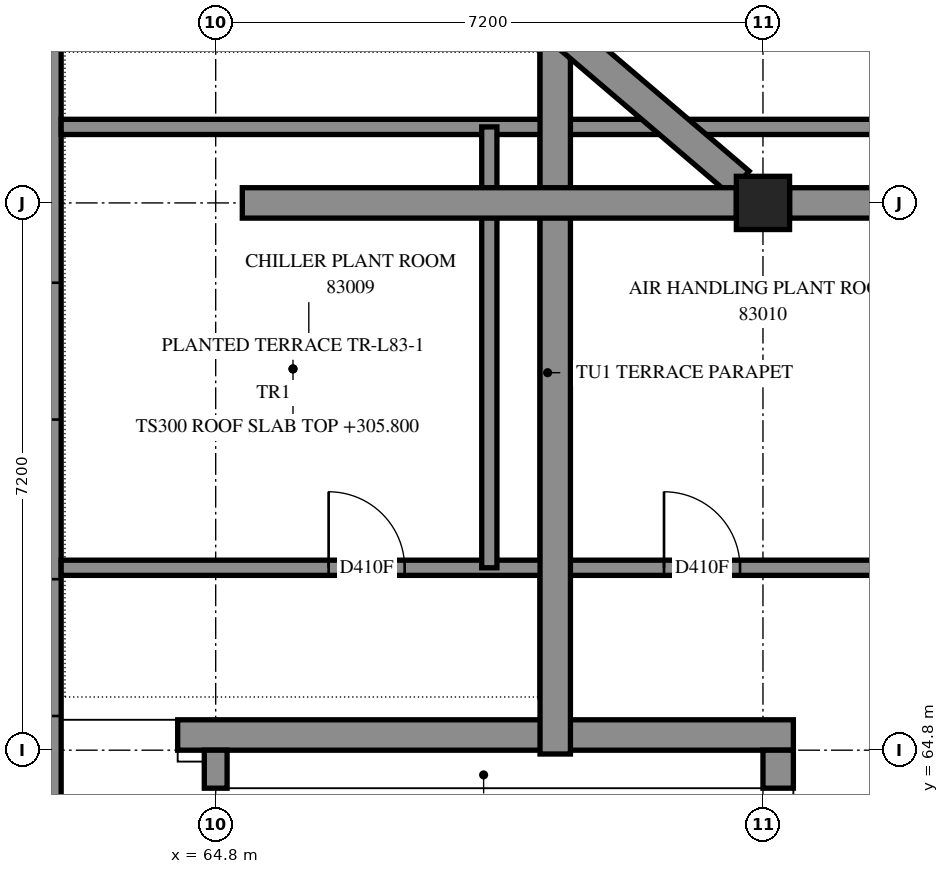
"""IFC4 building model, lengths in metres.
Left out: names, types, materials, properties, quantities, classifications, styles, units other than length and angle.
Written with IfcOpenShell. Run it as: python <this file> out.ifc"""

import sys

from ifc_helpers import new_model, si_unit, direction, frame, frame_2d, origin, origin_2d, place, context, subcontext, project, spatial, polyline, rectangle, outline, extrude, element, fill, save


model = new_model("IFC4")
c1 = context("Model", 3, precision=1e-05, world=origin(), true_north=direction((0.0, 1.0)))
c2 = subcontext(c1, "Body", "Model", "MODEL_VIEW")
j1 = project(units=[si_unit("LENGTHUNIT", "METRE"), si_unit("PLANEANGLEUNIT", "RADIAN")], contexts=[c1])
p1 = place(None, origin())
s1 = spatial("IfcSite", under=j1, at=p1, CompositionType="ELEMENT")
p2 = place(p1, origin())
s2 = spatial("IfcBuilding", under=s1, at=p2, CompositionType="ELEMENT")
p3 = place(p2, frame((0.0, 0.0, 305.8)))
s3 = spatial("IfcBuildingStorey", under=s2, at=p3, CompositionType="ELEMENT", Elevation=305.8)
p4 = place(p3, frame((72.0, 72.0, 0.0), z_axis=(0.0, 0.0, 1.0), x_axis=(1.0, 0.0, 0.0)))
e1 = element("IfcColumn", 1, at=p4, inside=s3, PredefinedType="COLUMN", context=c2, shape_type="SweptSolid", body=[
    extrude(rectangle(XDim=0.7, YDim=0.7, at=origin_2d()), origin(), (0.0, 0.0, 1.0), 3.5),
])
p5 = place(p3, frame((64.3, 65.0, -0.3), z_axis=(0.0, 0.0, 1.0), x_axis=(1.0, 0.0, 0.0)))
e2 = element("IfcWall", 2, at=p5, inside=s3, PredefinedType="SHEAR", context=c2, shape_type="SweptSolid", body=[
    extrude(outline(polyline([(0.0, 0.0), (8.1, 0.0), (8.1, 3.1), (0.0, 3.1), (0.0, 0.0)])), frame((0.0, 0.2, 0.0), z_axis=(0.0, -1.0, 0.0), x_axis=(1.0, 0.0, 0.0)), (0.0, 0.0, 1.0), 0.4),
])
p6 = place(p3, frame((72.2, 64.3, -0.3), z_axis=(0.0, 0.0, 1.0), x_axis=(0.0, 1.0, 0.0)))
e3 = element("IfcWall", 3, at=p6, inside=s3, PredefinedType="SHEAR", context=c2, shape_type="SweptSolid", body=[
    extrude(outline(polyline([(0.0, 0.0), (0.5, 0.0), (0.5, 3.1), (0.0, 3.1), (0.0, 0.0)])), frame((0.0, 0.2, 0.0), z_axis=(0.0, -1.0, 0.0), x_axis=(1.0, 0.0, 0.0)), (0.0, 0.0, 1.0), 0.4),
])
p7 = place(p3, frame((64.8, 64.3, 0.0), z_axis=(0.0, 0.0, 1.0), x_axis=(0.0, 1.0, 0.0)))
e4 = element("IfcWall", 4, at=p7, inside=s3, PredefinedType="SOLIDWALL", context=c2, shape_type="SweptSolid", body=[
    extrude(outline(polyline([(0.0, 0.0), (0.5, 0.0), (0.5, 3.5), (0.0, 3.5), (0.0, 0.0)])), frame((0.0, 0.15, 0.0), z_axis=(0.0, -1.0, 0.0), x_axis=(1.0, 0.0, 0.0)), (0.0, 0.0, 1.0), 0.3),
])
p8 = place(p3, frame((62.567, 74.233, 0.0), z_axis=(0.0, 0.0, 1.0), x_axis=(0.0, -1.0, 0.0)))
e5 = element("IfcWall", 5, at=p8, inside=s3, PredefinedType="SOLIDWALL", context=c2, shape_type="SweptSolid", body=[
    extrude(outline(polyline([(-0.2, -0.2), (11.866, -0.2), (11.466, 0.2), (0.2, 0.2), (-0.2, -0.2)])), origin(), (0.0, 0.0, 1.0), 3.5),
])
p9 = place(p8, frame((3.283, 0.0, 0.7)))
e6 = element("IfcOpeningElement", 6, at=p9, cuts=e5, PredefinedType="OPENING", context=c2, shape_type="SweptSolid", body=[
    extrude(rectangle(XDim=1.8, YDim=2.2, at=frame_2d((0.9, 1.1))), frame((0.0, 0.21, 0.0), z_axis=(0.0, -1.0, 0.0), x_axis=(1.0, 0.0, 0.0)), (0.0, 0.0, 1.0), 0.42),
])
p10 = place(p8, frame((7.183, 0.0, 0.7)))
e7 = element("IfcOpeningElement", 7, at=p10, cuts=e5, PredefinedType="OPENING", context=c2, shape_type="SweptSolid", body=[
    extrude(rectangle(XDim=1.8, YDim=2.2, at=frame_2d((0.9, 1.1))), frame((0.0, 0.21, 0.0), z_axis=(0.0, -1.0, 0.0), x_axis=(1.0, 0.0, 0.0)), (0.0, 0.0, 1.0), 0.42),
])
p11 = place(p3, frame((69.167, 65.5, 0.0), z_axis=(0.0, 0.0, 1.0), x_axis=(0.0, 1.0, 0.0)))
e8 = element("IfcWall", 8, at=p11, inside=s3, PredefinedType="PARAPET", context=c2, shape_type="SweptSolid", body=[
    extrude(outline(polyline([(0.0, -0.1), (8.533, -0.1), (8.533, 0.1), (0.0, 0.1), (0.0, -0.1)])), origin(), (0.0, 0.0, 1.0), 0.25),
])
p12 = place(p3, frame((62.767, 73.0, 0.0), z_axis=(0.0, 0.0, 1.0), x_axis=(1.0, 0.0, 0.0)))
e9 = element("IfcWall", 9, at=p12, inside=s3, PredefinedType="PARTITIONING", context=c2, shape_type="SweptSolid", body=[
    extrude(rectangle(XDim=16.947, YDim=0.2, at=frame_2d((8.473, 0.0))), origin(), (0.0, 0.0, 1.0), 3.5),
])
p13 = place(p3, frame((62.767, 67.2, 0.0), z_axis=(0.0, 0.0, 1.0), x_axis=(1.0, 0.0, 0.0)))
e10 = element("IfcWall", 10, at=p13, inside=s3, PredefinedType="PARTITIONING", context=c2, shape_type="SweptSolid", body=[
    extrude(rectangle(XDim=11.633, YDim=0.2, at=frame_2d((5.816, 0.0))), origin(), (0.0, 0.0, 1.0), 3.5),
])
p14 = place(p13, frame((3.519, 0.0, 0.0)))
e11 = element("IfcOpeningElement", 11, at=p14, cuts=e10, PredefinedType="OPENING", context=c2, shape_type="SweptSolid", body=[
    extrude(rectangle(XDim=1.0, YDim=2.1, at=frame_2d((0.5, 1.05))), frame((0.0, 0.11, 0.0), z_axis=(0.0, -1.0, 0.0), x_axis=(1.0, 0.0, 0.0)), (0.0, 0.0, 1.0), 0.22),
])
p15 = place(p13, frame((7.931, 0.0, 0.0)))
e12 = element("IfcOpeningElement", 12, at=p15, cuts=e10, PredefinedType="OPENING", context=c2, shape_type="SweptSolid", body=[
    extrude(rectangle(XDim=1.0, YDim=2.1, at=frame_2d((0.5, 1.05))), frame((0.0, 0.11, 0.0), z_axis=(0.0, -1.0, 0.0), x_axis=(1.0, 0.0, 0.0)), (0.0, 0.0, 1.0), 0.22),
])
p16 = place(p3, frame((68.4, 67.2, 0.0), z_axis=(0.0, 0.0, 1.0), x_axis=(0.0, 1.0, 0.0)))
e13 = element("IfcWall", 13, at=p16, inside=s3, PredefinedType="PARTITIONING", context=c2, shape_type="SweptSolid", body=[
    extrude(rectangle(XDim=5.8, YDim=0.2, at=frame_2d((2.9, 0.0))), origin(), (0.0, 0.0, 1.0), 3.5),
])
p17 = place(p14, origin())
e14 = element("IfcDoor", 14, at=p17, inside=s3, OperationType="SINGLE_SWING_RIGHT", PredefinedType="DOOR", context=c2, shape_type="SweptSolid", body=[
    extrude(rectangle(XDim=1.0, YDim=2.1, at=frame_2d((0.5, 1.05))), frame((0.0, 0.025, 0.0), z_axis=(0.0, -1.0, 0.0), x_axis=(1.0, 0.0, 0.0)), (0.0, 0.0, 1.0), 0.05),
])
fill(e11, e14)
p18 = place(p15, origin())
e15 = element("IfcDoor", 15, at=p18, inside=s3, OperationType="SINGLE_SWING_LEFT", PredefinedType="DOOR", context=c2, shape_type="SweptSolid", body=[
    extrude(rectangle(XDim=1.0, YDim=2.1, at=frame_2d((0.5, 1.05))), frame((0.0, 0.025, 0.0), z_axis=(0.0, -1.0, 0.0), x_axis=(1.0, 0.0, 0.0)), (0.0, 0.0, 1.0), 0.05),
])
fill(e12, e15)
save(model, sys.argv[1])
